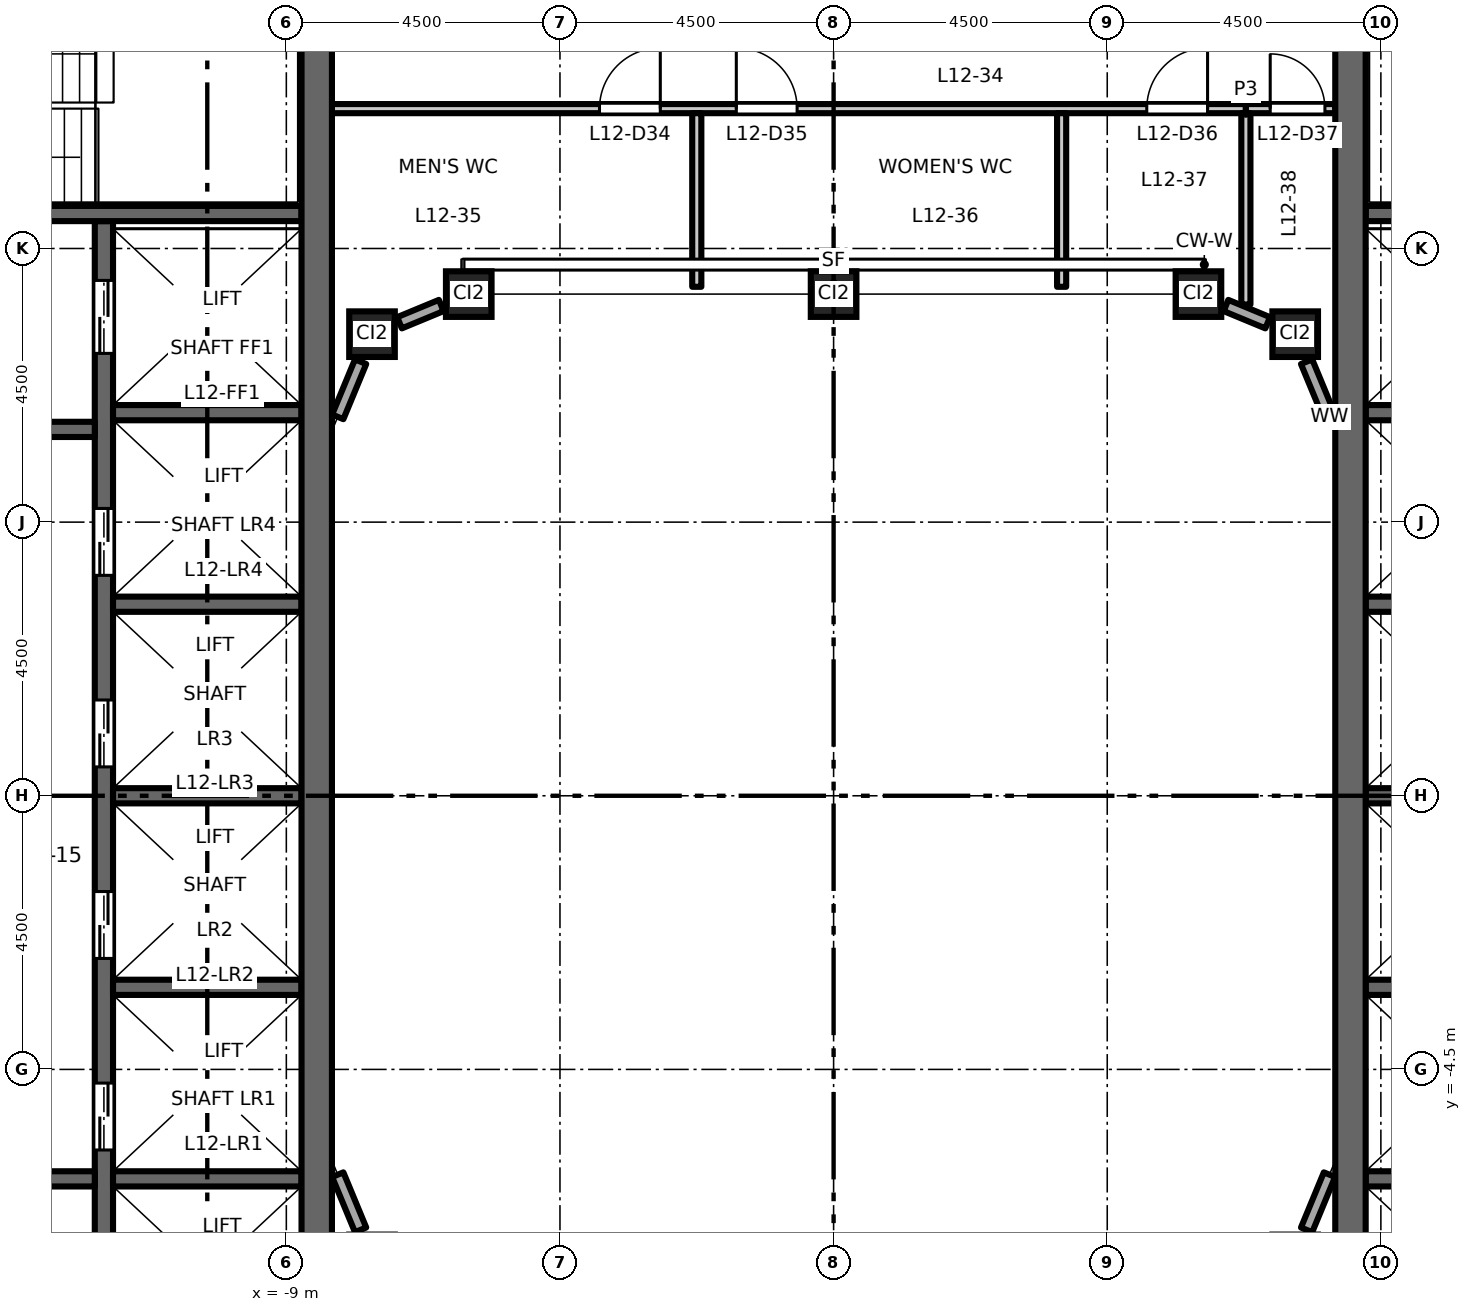
"""IFC4 building model, lengths in metres.
Left out: names, types, materials, properties, quantities, classifications, styles, units other than length and angle.
Written with IfcOpenShell. Run it as: python <this file> out.ifc"""

import sys

from ifc_helpers import new_model, si_unit, direction, frame, frame_2d, origin, origin_2d, place, context, subcontext, project, spatial, rectangle, hollow_rectangle, extrude, element, fill, save


model = new_model("IFC4")
c1 = context("Model", 3, precision=1e-05, world=origin(), true_north=direction((0.0, 1.0)))
c2 = subcontext(c1, "Body", "Model", "MODEL_VIEW")
j1 = project(units=[si_unit("LENGTHUNIT", "METRE"), si_unit("PLANEANGLEUNIT", "RADIAN")], contexts=[c1])
p1 = place(None, origin())
s1 = spatial("IfcSite", under=j1, at=p1, CompositionType="ELEMENT")
p2 = place(p1, origin())
s2 = spatial("IfcBuilding", under=s1, at=p2, CompositionType="ELEMENT")
p3 = place(p2, frame((0.0, 0.0, 58.2)))
s3 = spatial("IfcBuildingStorey", under=s2, at=p3, CompositionType="ELEMENT", Elevation=58.2)
for number, where, z_axis, x_axis in (
    (1, (-7.591, 7.591, 0.0), (0.0, 0.0, 1.0), (1.0, 0.0, 0.0)),
    (2, (-6.0, 8.25, 0.0), (0.0, 0.0, 1.0), (1.0, 0.0, 0.0)),
    (3, (0.0, 8.25, 0.0), (0.0, 0.0, 1.0), (1.0, 0.0, 0.0)),
    (4, (6.0, 8.25, 0.0), (0.0, 0.0, 1.0), (1.0, 0.0, 0.0)),
    (5, (7.591, 7.591, 0.0), (0.0, 0.0, 1.0), (1.0, 0.0, 0.0)),
):
    element("IfcColumn", number, at=place(p3, frame(where, z_axis=z_axis, x_axis=x_axis)), inside=s3, PredefinedType="COLUMN", context=c2, shape_type="SweptSolid", body=[
        extrude(hollow_rectangle(XDim=0.75, YDim=0.75, WallThickness=0.045, at=origin_2d()), origin(), (0.0, 0.0, 1.0), 4.5),
    ])
p4 = place(p3, frame((-12.0, -9.45, 0.0), z_axis=(0.0, 0.0, 1.0), x_axis=(0.0, 1.0, 0.0)))
e6 = element("IfcWall", 6, at=p4, inside=s3, PredefinedType="SHEAR", context=c2, shape_type="SweptSolid", body=[
    extrude(rectangle(XDim=18.9, YDim=0.3, at=frame_2d((9.45, 0.0))), origin(), (0.0, 0.0, 1.0), 4.35),
])
p5 = place(p4, frame((3.625, 0.0, 0.0)))
e7 = element("IfcOpeningElement", 7, at=p5, cuts=e6, PredefinedType="OPENING", context=c2, shape_type="SweptSolid", body=[
    extrude(rectangle(XDim=1.1, YDim=2.1, at=frame_2d((0.55, 1.05))), frame((0.0, 0.16, 0.0), z_axis=(0.0, -1.0, 0.0), x_axis=(1.0, 0.0, 0.0)), (0.0, 0.0, 1.0), 0.32),
])
p6 = place(p4, frame((6.775, 0.0, 0.0)))
e8 = element("IfcOpeningElement", 8, at=p6, cuts=e6, PredefinedType="OPENING", context=c2, shape_type="SweptSolid", body=[
    extrude(rectangle(XDim=1.1, YDim=2.1, at=frame_2d((0.55, 1.05))), frame((0.0, 0.16, 0.0), z_axis=(0.0, -1.0, 0.0), x_axis=(1.0, 0.0, 0.0)), (0.0, 0.0, 1.0), 0.32),
])
p7 = place(p4, frame((9.925, 0.0, 0.0)))
e9 = element("IfcOpeningElement", 9, at=p7, cuts=e6, PredefinedType="OPENING", context=c2, shape_type="SweptSolid", body=[
    extrude(rectangle(XDim=1.1, YDim=2.1, at=frame_2d((0.55, 1.05))), frame((0.0, 0.16, 0.0), z_axis=(0.0, -1.0, 0.0), x_axis=(1.0, 0.0, 0.0)), (0.0, 0.0, 1.0), 0.32),
])
p8 = place(p4, frame((13.075, 0.0, 0.0)))
e10 = element("IfcOpeningElement", 10, at=p8, cuts=e6, PredefinedType="OPENING", context=c2, shape_type="SweptSolid", body=[
    extrude(rectangle(XDim=1.1, YDim=2.1, at=frame_2d((0.55, 1.05))), frame((0.0, 0.16, 0.0), z_axis=(0.0, -1.0, 0.0), x_axis=(1.0, 0.0, 0.0)), (0.0, 0.0, 1.0), 0.32),
])
p9 = place(p4, frame((16.725, 0.0, 0.0)))
e11 = element("IfcOpeningElement", 11, at=p9, cuts=e6, PredefinedType="OPENING", context=c2, shape_type="SweptSolid", body=[
    extrude(rectangle(XDim=1.2, YDim=2.1, at=frame_2d((0.6, 1.05))), frame((0.0, 0.16, 0.0), z_axis=(0.0, -1.0, 0.0), x_axis=(1.0, 0.0, 0.0)), (0.0, 0.0, 1.0), 0.32),
])
p10 = place(p4, frame((0.975, 0.0, 0.0)))
e12 = element("IfcOpeningElement", 12, at=p10, cuts=e6, PredefinedType="OPENING", context=c2, shape_type="SweptSolid", body=[
    extrude(rectangle(XDim=1.2, YDim=2.1, at=frame_2d((0.6, 1.05))), frame((0.0, 0.16, 0.0), z_axis=(0.0, -1.0, 0.0), x_axis=(1.0, 0.0, 0.0)), (0.0, 0.0, 1.0), 0.32),
])
p11 = place(p3, frame((-12.15, 6.025, 0.0), z_axis=(0.0, 0.0, 1.0), x_axis=(-1.0, 0.0, 0.0)))
e13 = element("IfcWall", 13, at=p11, inside=s3, PredefinedType="SHEAR", context=c2, shape_type="SweptSolid", body=[
    extrude(rectangle(XDim=4.6, YDim=0.25, at=frame_2d((2.3, 0.0))), origin(), (0.0, 0.0, 1.0), 4.35),
])
p12 = place(p11, frame((1.8, 0.0, 0.0)))
e14 = element("IfcOpeningElement", 14, at=p12, cuts=e13, PredefinedType="OPENING", context=c2, shape_type="SweptSolid", body=[
    extrude(rectangle(XDim=1.0, YDim=2.1, at=frame_2d((0.5, 1.05))), frame((0.0, 0.135, 0.0), z_axis=(0.0, -1.0, 0.0), x_axis=(1.0, 0.0, 0.0)), (0.0, 0.0, 1.0), 0.27),
])
p13 = place(p3, frame((-12.15, -6.3, 0.0), z_axis=(0.0, 0.0, 1.0), x_axis=(-1.0, 0.0, 0.0)))
e15 = element("IfcWall", 15, at=p13, inside=s3, PredefinedType="SHEAR", context=c2, shape_type="SweptSolid", body=[
    extrude(rectangle(XDim=9.1, YDim=0.25, at=frame_2d((4.55, 0.0))), origin(), (0.0, 0.0, 1.0), 4.35),
])
p14 = place(p13, frame((1.8, 0.0, 0.0)))
e16 = element("IfcOpeningElement", 16, at=p14, cuts=e15, PredefinedType="OPENING", context=c2, shape_type="SweptSolid", body=[
    extrude(rectangle(XDim=1.0, YDim=2.1, at=frame_2d((0.5, 1.05))), frame((0.0, 0.135, 0.0), z_axis=(0.0, -1.0, 0.0), x_axis=(1.0, 0.0, 0.0)), (0.0, 0.0, 1.0), 0.27),
])
p15 = place(p13, frame((6.65, 0.0, 0.0)))
e17 = element("IfcOpeningElement", 17, at=p15, cuts=e15, PredefinedType="OPENING", context=c2, shape_type="SweptSolid", body=[
    extrude(rectangle(XDim=0.9, YDim=2.1, at=frame_2d((0.45, 1.05))), frame((0.0, 0.135, 0.0), z_axis=(0.0, -1.0, 0.0), x_axis=(1.0, 0.0, 0.0)), (0.0, 0.0, 1.0), 0.27),
])
for number, where, z_axis, x_axis in (
    (18, (-8.75, 0.0, 0.0), (0.0, 0.0, 1.0), (-1.0, 0.0, 0.0)),
    (19, (-8.75, 3.15, 0.0), (0.0, 0.0, 1.0), (-1.0, 0.0, 0.0)),
    (20, (-8.75, 6.3, 0.0), (0.0, 0.0, 1.0), (-1.0, 0.0, 0.0)),
    (21, (-8.75, -3.15, 0.0), (0.0, 0.0, 1.0), (-1.0, 0.0, 0.0)),
    (22, (-8.75, -6.3, 0.0), (0.0, 0.0, 1.0), (-1.0, 0.0, 0.0)),
):
    element("IfcWall", number, at=place(p3, frame(where, z_axis=z_axis, x_axis=x_axis)), inside=s3, PredefinedType="SHEAR", context=c2, shape_type="SweptSolid", body=[
        extrude(rectangle(XDim=3.1, YDim=0.25, at=frame_2d((1.55, 0.0))), origin(), (0.0, 0.0, 1.0), 4.35),
    ])
p16 = place(p3, frame((-8.75, 9.575, 0.0), z_axis=(0.0, 0.0, 1.0), x_axis=(-1.0, 0.0, 0.0)))
e23 = element("IfcWall", 23, at=p16, inside=s3, PredefinedType="SHEAR", context=c2, shape_type="SweptSolid", body=[
    extrude(rectangle(XDim=8.0, YDim=0.25, at=frame_2d((4.0, 0.0))), origin(), (0.0, 0.0, 1.0), 4.35),
])
p17 = place(p16, frame((6.65, 0.0, 0.0)))
e24 = element("IfcOpeningElement", 24, at=p17, cuts=e23, PredefinedType="OPENING", context=c2, shape_type="SweptSolid", body=[
    extrude(rectangle(XDim=1.1, YDim=2.1, at=frame_2d((0.55, 1.05))), frame((0.0, 0.135, 0.0), z_axis=(0.0, -1.0, 0.0), x_axis=(1.0, 0.0, 0.0)), (0.0, 0.0, 1.0), 0.27),
])
p18 = place(p3, frame((-8.5, -13.0, 0.0), z_axis=(0.0, 0.0, 1.0), x_axis=(0.0, 1.0, 0.0)))
e25 = element("IfcWall", 25, at=p18, inside=s3, PredefinedType="SHEAR", context=c2, shape_type="SweptSolid", body=[
    extrude(rectangle(XDim=26.0, YDim=0.5, at=frame_2d((13.0, 0.0))), origin(), (0.0, 0.0, 1.0), 4.35),
])
for number, where, z_axis, x_axis in (
    (26, (8.75, 0.0, 0.0), (0.0, 0.0, 1.0), (1.0, 0.0, 0.0)),
    (27, (8.75, 3.15, 0.0), (0.0, 0.0, 1.0), (1.0, 0.0, 0.0)),
    (28, (8.75, 6.3, 0.0), (0.0, 0.0, 1.0), (1.0, 0.0, 0.0)),
    (29, (8.75, -3.15, 0.0), (0.0, 0.0, 1.0), (1.0, 0.0, 0.0)),
    (30, (8.75, -6.3, 0.0), (0.0, 0.0, 1.0), (1.0, 0.0, 0.0)),
):
    element("IfcWall", number, at=place(p3, frame(where, z_axis=z_axis, x_axis=x_axis)), inside=s3, PredefinedType="SHEAR", context=c2, shape_type="SweptSolid", body=[
        extrude(rectangle(XDim=3.1, YDim=0.25, at=frame_2d((1.55, 0.0))), origin(), (0.0, 0.0, 1.0), 4.35),
    ])
p19 = place(p3, frame((8.75, 9.575, 0.0), z_axis=(0.0, 0.0, 1.0), x_axis=(1.0, 0.0, 0.0)))
e31 = element("IfcWall", 31, at=p19, inside=s3, PredefinedType="SHEAR", context=c2, shape_type="SweptSolid", body=[
    extrude(rectangle(XDim=8.0, YDim=0.25, at=frame_2d((4.0, 0.0))), origin(), (0.0, 0.0, 1.0), 4.35),
])
p20 = place(p19, frame((6.65, 0.0, 0.0)))
e32 = element("IfcOpeningElement", 32, at=p20, cuts=e31, PredefinedType="OPENING", context=c2, shape_type="SweptSolid", body=[
    extrude(rectangle(XDim=1.1, YDim=2.1, at=frame_2d((0.55, 1.05))), frame((0.0, 0.135, 0.0), z_axis=(0.0, -1.0, 0.0), x_axis=(1.0, 0.0, 0.0)), (0.0, 0.0, 1.0), 0.27),
])
p21 = place(p3, frame((8.5, -13.0, 0.0), z_axis=(0.0, 0.0, 1.0), x_axis=(0.0, 1.0, 0.0)))
e33 = element("IfcWall", 33, at=p21, inside=s3, PredefinedType="SHEAR", context=c2, shape_type="SweptSolid", body=[
    extrude(rectangle(XDim=26.0, YDim=0.5, at=frame_2d((13.0, 0.0))), origin(), (0.0, 0.0, 1.0), 4.35),
])
for number, where, z_axis, x_axis in (
    (34, (7.779, -7.138, 0.0), (0.0, 0.0, 1.0), (0.383, 0.924, 0.0)),
    (35, (8.154, 6.231, 0.0), (0.0, 0.0, 1.0), (-0.383, 0.924, 0.0)),
):
    element("IfcWall", number, at=place(p3, frame(where, z_axis=z_axis, x_axis=x_axis)), inside=s3, PredefinedType="STANDARD", context=c2, shape_type="SweptSolid", body=[
        extrude(rectangle(XDim=0.982, YDim=0.2, at=frame_2d((0.491, 0.0))), origin(), (0.0, 0.0, 1.0), 3.73),
    ])
for number, where, z_axis, x_axis in (
    (36, (7.138, 7.779, 0.0), (0.0, 0.0, 1.0), (-0.924, 0.383, 0.0)),
    (37, (-6.453, 8.062, 0.0), (0.0, 0.0, 1.0), (-0.924, -0.383, 0.0)),
):
    element("IfcWall", number, at=place(p3, frame(where, z_axis=z_axis, x_axis=x_axis)), inside=s3, PredefinedType="STANDARD", context=c2, shape_type="SweptSolid", body=[
        extrude(rectangle(XDim=0.742, YDim=0.2, at=frame_2d((0.371, 0.0))), origin(), (0.0, 0.0, 1.0), 3.73),
    ])
for number, where, z_axis, x_axis in (
    (38, (-7.779, 7.138, 0.0), (0.0, 0.0, 1.0), (-0.383, -0.924, 0.0)),
    (39, (-8.154, -6.231, 0.0), (0.0, 0.0, 1.0), (0.383, -0.924, 0.0)),
):
    element("IfcWall", number, at=place(p3, frame(where, z_axis=z_axis, x_axis=x_axis)), inside=s3, PredefinedType="STANDARD", context=c2, shape_type="SweptSolid", body=[
        extrude(rectangle(XDim=0.982, YDim=0.2, at=frame_2d((0.491, 0.0))), origin(), (0.0, 0.0, 1.0), 3.73),
    ])
p22 = place(p3, frame((-8.25, 11.3, 0.0), z_axis=(0.0, 0.0, 1.0), x_axis=(1.0, 0.0, 0.0)))
e40 = element("IfcWall", 40, at=p22, inside=s3, PredefinedType="PARTITIONING", context=c2, shape_type="SweptSolid", body=[
    extrude(rectangle(XDim=15.03, YDim=0.15, at=frame_2d((7.515, 0.0))), origin(), (0.0, 0.0, 1.0), 4.35),
])
p23 = place(p22, frame((4.4, 0.0, 0.0)))
e41 = element("IfcOpeningElement", 41, at=p23, cuts=e40, PredefinedType="OPENING", context=c2, shape_type="SweptSolid", body=[
    extrude(rectangle(XDim=1.0, YDim=2.1, at=frame_2d((0.5, 1.05))), frame((0.0, 0.085, 0.0), z_axis=(0.0, -1.0, 0.0), x_axis=(1.0, 0.0, 0.0)), (0.0, 0.0, 1.0), 0.17),
])
p24 = place(p22, frame((6.65, 0.0, 0.0)))
e42 = element("IfcOpeningElement", 42, at=p24, cuts=e40, PredefinedType="OPENING", context=c2, shape_type="SweptSolid", body=[
    extrude(rectangle(XDim=1.0, YDim=2.1, at=frame_2d((0.5, 1.05))), frame((0.0, 0.085, 0.0), z_axis=(0.0, -1.0, 0.0), x_axis=(1.0, 0.0, 0.0)), (0.0, 0.0, 1.0), 0.17),
])
p25 = place(p22, frame((13.4, 0.0, 0.0)))
e43 = element("IfcOpeningElement", 43, at=p25, cuts=e40, PredefinedType="OPENING", context=c2, shape_type="SweptSolid", body=[
    extrude(rectangle(XDim=1.0, YDim=2.1, at=frame_2d((0.5, 1.05))), frame((0.0, 0.085, 0.0), z_axis=(0.0, -1.0, 0.0), x_axis=(1.0, 0.0, 0.0)), (0.0, 0.0, 1.0), 0.17),
])
p26 = place(p3, frame((6.78, 11.3, 0.0), z_axis=(0.0, 0.0, 1.0), x_axis=(1.0, 0.0, 0.0)))
e44 = element("IfcWall", 44, at=p26, inside=s3, PredefinedType="PARTITIONING", context=c2, shape_type="SweptSolid", body=[
    extrude(rectangle(XDim=1.47, YDim=0.15, at=frame_2d((0.735, 0.0))), origin(), (0.0, 0.0, 1.0), 4.35),
])
p27 = place(p26, frame((0.4, 0.0, 0.0)))
e45 = element("IfcOpeningElement", 45, at=p27, cuts=e44, PredefinedType="OPENING", context=c2, shape_type="SweptSolid", body=[
    extrude(rectangle(XDim=0.9, YDim=2.1, at=frame_2d((0.45, 1.05))), frame((0.0, 0.085, 0.0), z_axis=(0.0, -1.0, 0.0), x_axis=(1.0, 0.0, 0.0)), (0.0, 0.0, 1.0), 0.17),
])
for number, where, z_axis, x_axis in (
    (46, (-2.25, 8.37, 0.0), (0.0, 0.0, 1.0), (0.0, 1.0, 0.0)),
    (47, (3.75, 8.37, 0.0), (0.0, 0.0, 1.0), (0.0, 1.0, 0.0)),
):
    element("IfcWall", number, at=place(p3, frame(where, z_axis=z_axis, x_axis=x_axis)), inside=s3, PredefinedType="PARTITIONING", context=c2, shape_type="SweptSolid", body=[
        extrude(rectangle(XDim=2.855, YDim=0.15, at=frame_2d((1.427, 0.0))), origin(), (0.0, 0.0, 1.0), 4.35),
    ])
p28 = place(p3, frame((6.78, 8.079, 0.0), z_axis=(0.0, 0.0, 1.0), x_axis=(0.0, 1.0, 0.0)))
e48 = element("IfcWall", 48, at=p28, inside=s3, PredefinedType="PARTITIONING", context=c2, shape_type="SweptSolid", body=[
    extrude(rectangle(XDim=3.146, YDim=0.15, at=frame_2d((1.573, 0.0))), origin(), (0.0, 0.0, 1.0), 4.35),
])
p29 = place(p5, origin())
e49 = element("IfcDoor", 49, at=p29, inside=s3, OperationType="DOUBLE_DOOR_SLIDING", PredefinedType="DOOR", context=c2, shape_type="SweptSolid", body=[
    extrude(rectangle(XDim=1.1, YDim=2.1, at=frame_2d((0.55, 1.05))), frame((0.0, 0.025, 0.0), z_axis=(0.0, -1.0, 0.0), x_axis=(1.0, 0.0, 0.0)), (0.0, 0.0, 1.0), 0.05),
])
fill(e7, e49)
p30 = place(p6, origin())
e50 = element("IfcDoor", 50, at=p30, inside=s3, OperationType="DOUBLE_DOOR_SLIDING", PredefinedType="DOOR", context=c2, shape_type="SweptSolid", body=[
    extrude(rectangle(XDim=1.1, YDim=2.1, at=frame_2d((0.55, 1.05))), frame((0.0, 0.025, 0.0), z_axis=(0.0, -1.0, 0.0), x_axis=(1.0, 0.0, 0.0)), (0.0, 0.0, 1.0), 0.05),
])
fill(e8, e50)
p31 = place(p7, origin())
e51 = element("IfcDoor", 51, at=p31, inside=s3, OperationType="DOUBLE_DOOR_SLIDING", PredefinedType="DOOR", context=c2, shape_type="SweptSolid", body=[
    extrude(rectangle(XDim=1.1, YDim=2.1, at=frame_2d((0.55, 1.05))), frame((0.0, 0.025, 0.0), z_axis=(0.0, -1.0, 0.0), x_axis=(1.0, 0.0, 0.0)), (0.0, 0.0, 1.0), 0.05),
])
fill(e9, e51)
p32 = place(p8, origin())
e52 = element("IfcDoor", 52, at=p32, inside=s3, OperationType="DOUBLE_DOOR_SLIDING", PredefinedType="DOOR", context=c2, shape_type="SweptSolid", body=[
    extrude(rectangle(XDim=1.1, YDim=2.1, at=frame_2d((0.55, 1.05))), frame((0.0, 0.025, 0.0), z_axis=(0.0, -1.0, 0.0), x_axis=(1.0, 0.0, 0.0)), (0.0, 0.0, 1.0), 0.05),
])
fill(e10, e52)
p33 = place(p9, origin())
e53 = element("IfcDoor", 53, at=p33, inside=s3, OperationType="DOUBLE_DOOR_SLIDING", PredefinedType="DOOR", context=c2, shape_type="SweptSolid", body=[
    extrude(rectangle(XDim=1.2, YDim=2.1, at=frame_2d((0.6, 1.05))), frame((0.0, 0.025, 0.0), z_axis=(0.0, -1.0, 0.0), x_axis=(1.0, 0.0, 0.0)), (0.0, 0.0, 1.0), 0.05),
])
fill(e11, e53)
p34 = place(p23, origin())
e54 = element("IfcDoor", 54, at=p34, inside=s3, OperationType="SINGLE_SWING_RIGHT", PredefinedType="DOOR", context=c2, shape_type="SweptSolid", body=[
    extrude(rectangle(XDim=1.0, YDim=2.1, at=frame_2d((0.5, 1.05))), frame((0.0, 0.025, 0.0), z_axis=(0.0, -1.0, 0.0), x_axis=(1.0, 0.0, 0.0)), (0.0, 0.0, 1.0), 0.05),
])
fill(e41, e54)
p35 = place(p24, origin())
e55 = element("IfcDoor", 55, at=p35, inside=s3, OperationType="SINGLE_SWING_LEFT", PredefinedType="DOOR", context=c2, shape_type="SweptSolid", body=[
    extrude(rectangle(XDim=1.0, YDim=2.1, at=frame_2d((0.5, 1.05))), frame((0.0, 0.025, 0.0), z_axis=(0.0, -1.0, 0.0), x_axis=(1.0, 0.0, 0.0)), (0.0, 0.0, 1.0), 0.05),
])
fill(e42, e55)
p36 = place(p25, origin())
e56 = element("IfcDoor", 56, at=p36, inside=s3, OperationType="SINGLE_SWING_RIGHT", PredefinedType="DOOR", context=c2, shape_type="SweptSolid", body=[
    extrude(rectangle(XDim=1.0, YDim=2.1, at=frame_2d((0.5, 1.05))), frame((0.0, 0.025, 0.0), z_axis=(0.0, -1.0, 0.0), x_axis=(1.0, 0.0, 0.0)), (0.0, 0.0, 1.0), 0.05),
])
fill(e43, e56)
p37 = place(p27, origin())
e57 = element("IfcDoor", 57, at=p37, inside=s3, OperationType="SINGLE_SWING_LEFT", PredefinedType="DOOR", context=c2, shape_type="SweptSolid", body=[
    extrude(rectangle(XDim=0.9, YDim=2.1, at=frame_2d((0.45, 1.05))), frame((0.0, 0.025, 0.0), z_axis=(0.0, -1.0, 0.0), x_axis=(1.0, 0.0, 0.0)), (0.0, 0.0, 1.0), 0.05),
])
fill(e45, e57)
save(model, sys.argv[1])
